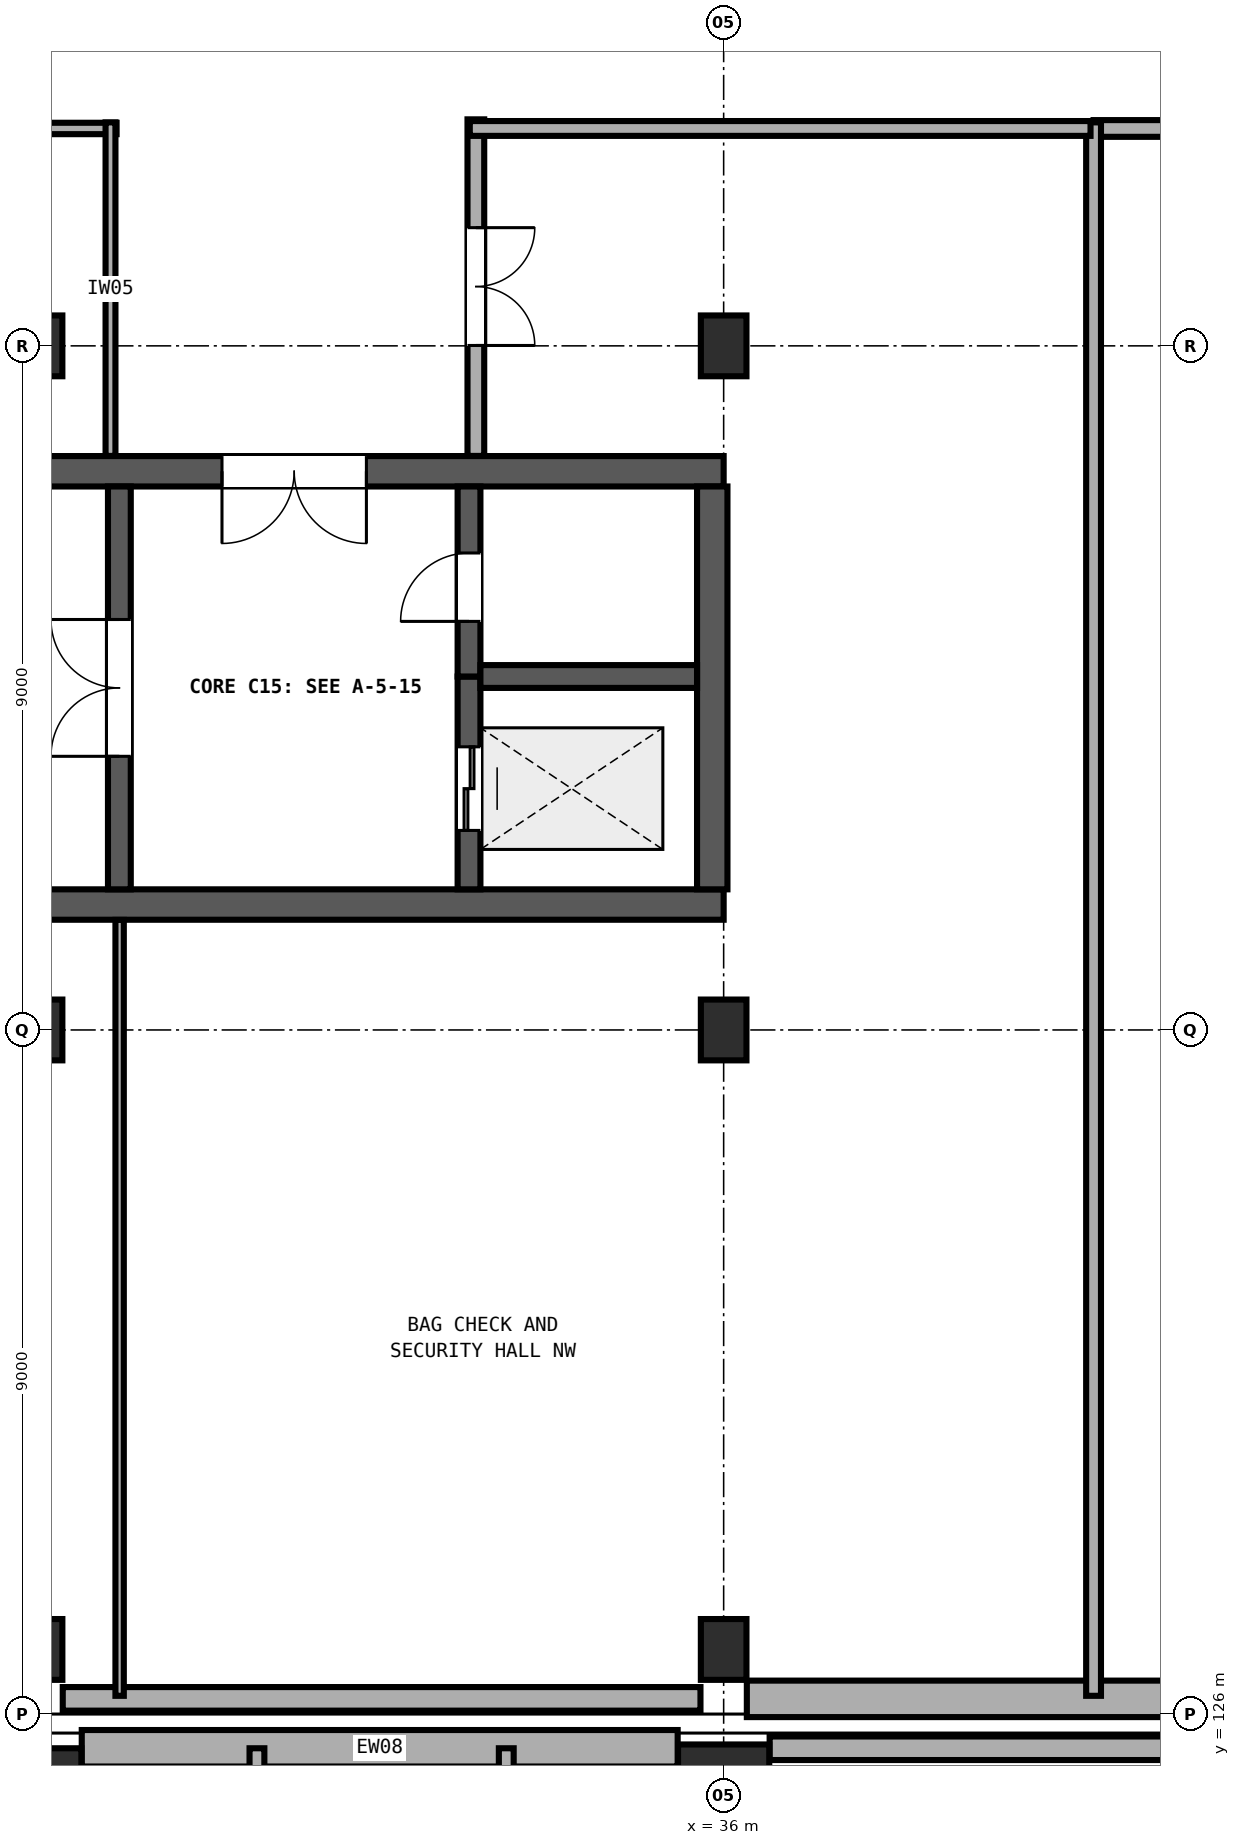
"""IFC4 building model, lengths in metres.
Left out: names, types, materials, properties, quantities, classifications, styles, units other than length and angle.
Written with IfcOpenShell. Run it as: python <this file> out.ifc"""

import sys

from ifc_helpers import new_model, si_unit, direction, frame, frame_2d, origin, origin_2d, place, context, subcontext, project, spatial, rectangle, extrude, element, fill, save


model = new_model("IFC4")
c1 = context("Model", 3, precision=1e-05, world=origin(), true_north=direction((0.0, 1.0)))
c2 = subcontext(c1, "Body", "Model", "MODEL_VIEW")
j1 = project(units=[si_unit("LENGTHUNIT", "METRE"), si_unit("PLANEANGLEUNIT", "RADIAN")], contexts=[c1])
p1 = place(None, origin())
s1 = spatial("IfcSite", under=j1, at=p1, CompositionType="ELEMENT")
p2 = place(p1, origin())
s2 = spatial("IfcBuilding", under=s1, at=p2, CompositionType="ELEMENT")
p3 = place(p2, origin())
s3 = spatial("IfcBuildingStorey", under=s2, at=p3, CompositionType="ELEMENT", Elevation=0.0)
p4 = place(p3, frame((27.0, 124.9, 0.0), z_axis=(0.0, 0.0, 1.0), x_axis=(1.0, 0.0, 0.0)))
e1 = element("IfcColumn", 1, at=p4, inside=s3, PredefinedType="COLUMN", context=c2, shape_type="SweptSolid", body=[
    extrude(rectangle(XDim=1.1, YDim=1.3, at=origin_2d()), origin(), (0.0, 0.0, 1.0), 4.8),
])
p5 = place(p3, frame((36.0, 124.9, 0.0), z_axis=(0.0, 0.0, 1.0), x_axis=(1.0, 0.0, 0.0)))
e2 = element("IfcColumn", 2, at=p5, inside=s3, PredefinedType="COLUMN", context=c2, shape_type="SweptSolid", body=[
    extrude(rectangle(XDim=1.2, YDim=1.4, at=origin_2d()), origin(), (0.0, 0.0, 1.0), 4.8),
])
for number, where, z_axis, x_axis in (
    (3, (27.0, 126.85, 0.0), (0.0, 0.0, 1.0), (1.0, 0.0, 0.0)),
    (4, (27.0, 135.0, 0.0), (0.0, 0.0, 1.0), (1.0, 0.0, 0.0)),
    (5, (27.0, 144.0, 0.0), (0.0, 0.0, 1.0), (1.0, 0.0, 0.0)),
    (6, (36.0, 126.85, 0.0), (0.0, 0.0, 1.0), (1.0, 0.0, 0.0)),
    (7, (36.0, 135.0, 0.0), (0.0, 0.0, 1.0), (1.0, 0.0, 0.0)),
    (8, (36.0, 144.0, 0.0), (0.0, 0.0, 1.0), (1.0, 0.0, 0.0)),
):
    element("IfcColumn", number, at=place(p3, frame(where, z_axis=z_axis, x_axis=x_axis)), inside=s3, PredefinedType="COLUMN", context=c2, shape_type="SweptSolid", body=[
        extrude(rectangle(XDim=0.6, YDim=0.8, at=origin_2d()), origin(), (0.0, 0.0, 1.0), 4.8),
    ])
p6 = place(p3, frame((18.0, 136.65, 0.0), z_axis=(0.0, 0.0, 1.0), x_axis=(1.0, 0.0, 0.0)))
e9 = element("IfcWall", 9, at=p6, inside=s3, PredefinedType="SHEAR", context=c2, shape_type="SweptSolid", body=[
    extrude(rectangle(XDim=18.0, YDim=0.4, at=frame_2d((9.0, 0.0))), origin(), (0.0, 0.0, 1.0), 4.5),
])
p7 = place(p3, frame((36.0, 142.35, 0.0), z_axis=(0.0, 0.0, 1.0), x_axis=(-1.0, 0.0, 0.0)))
e10 = element("IfcWall", 10, at=p7, inside=s3, PredefinedType="SHEAR", context=c2, shape_type="SweptSolid", body=[
    extrude(rectangle(XDim=18.0, YDim=0.4, at=frame_2d((9.0, 0.0))), origin(), (0.0, 0.0, 1.0), 4.5),
])
p8 = place(p7, frame((4.7, 0.0, 0.0)))
e11 = element("IfcOpeningElement", 11, at=p8, cuts=e10, PredefinedType="OPENING", context=c2, shape_type="SweptSolid", body=[
    extrude(rectangle(XDim=1.9, YDim=2.25, at=frame_2d((0.95, 1.125))), frame((0.0, 0.21, 0.0), z_axis=(0.0, -1.0, 0.0), x_axis=(1.0, 0.0, 0.0)), (0.0, 0.0, 1.0), 0.42),
])
p9 = place(p3, frame((35.85, 136.85, 0.0), z_axis=(0.0, 0.0, 1.0), x_axis=(0.0, 1.0, 0.0)))
e12 = element("IfcWall", 12, at=p9, inside=s3, PredefinedType="SHEAR", context=c2, shape_type="SweptSolid", body=[
    extrude(rectangle(XDim=5.3, YDim=0.4, at=frame_2d((2.65, 0.0))), origin(), (0.0, 0.0, 1.0), 4.5),
])
p10 = place(p3, frame((28.05, 136.85, 0.0), z_axis=(0.0, 0.0, 1.0), x_axis=(0.0, 1.0, 0.0)))
e13 = element("IfcWall", 13, at=p10, inside=s3, PredefinedType="SHEAR", context=c2, shape_type="SweptSolid", body=[
    extrude(rectangle(XDim=5.3, YDim=0.3, at=frame_2d((2.65, 0.0))), origin(), (0.0, 0.0, 1.0), 4.5),
])
p11 = place(p10, frame((1.75, 0.0, 0.0)))
e14 = element("IfcOpeningElement", 14, at=p11, cuts=e13, PredefinedType="OPENING", context=c2, shape_type="SweptSolid", body=[
    extrude(rectangle(XDim=1.8, YDim=2.25, at=frame_2d((0.9, 1.125))), frame((0.0, 0.16, 0.0), z_axis=(0.0, -1.0, 0.0), x_axis=(1.0, 0.0, 0.0)), (0.0, 0.0, 1.0), 0.32),
])
p12 = place(p3, frame((32.65, 136.85, 0.0), z_axis=(0.0, 0.0, 1.0), x_axis=(0.0, 1.0, 0.0)))
e15 = element("IfcWall", 15, at=p12, inside=s3, PredefinedType="SHEAR", context=c2, shape_type="SweptSolid", body=[
    extrude(rectangle(XDim=2.8, YDim=0.3, at=frame_2d((1.4, 0.0))), origin(), (0.0, 0.0, 1.0), 4.5),
])
p13 = place(p12, frame((0.775, 0.0, 0.0)))
e16 = element("IfcOpeningElement", 16, at=p13, cuts=e15, PredefinedType="OPENING", context=c2, shape_type="SweptSolid", body=[
    extrude(rectangle(XDim=1.1, YDim=2.1, at=frame_2d((0.55, 1.05))), frame((0.0, 0.16, 0.0), z_axis=(0.0, -1.0, 0.0), x_axis=(1.0, 0.0, 0.0)), (0.0, 0.0, 1.0), 0.32),
])
p14 = place(p3, frame((32.65, 139.65, 0.0), z_axis=(0.0, 0.0, 1.0), x_axis=(0.0, 1.0, 0.0)))
e17 = element("IfcWall", 17, at=p14, inside=s3, PredefinedType="SHEAR", context=c2, shape_type="SweptSolid", body=[
    extrude(rectangle(XDim=2.5, YDim=0.3, at=frame_2d((1.25, 0.0))), origin(), (0.0, 0.0, 1.0), 4.5),
])
p15 = place(p14, frame((0.725, 0.0, 0.0)))
e18 = element("IfcOpeningElement", 18, at=p15, cuts=e17, PredefinedType="OPENING", context=c2, shape_type="SweptSolid", body=[
    extrude(rectangle(XDim=0.9, YDim=2.1, at=frame_2d((0.45, 1.05))), frame((0.0, 0.16, 0.0), z_axis=(0.0, -1.0, 0.0), x_axis=(1.0, 0.0, 0.0)), (0.0, 0.0, 1.0), 0.32),
])
p16 = place(p3, frame((32.8, 139.65, 0.0), z_axis=(0.0, 0.0, 1.0), x_axis=(1.0, 0.0, 0.0)))
e19 = element("IfcWall", 19, at=p16, inside=s3, PredefinedType="SHEAR", context=c2, shape_type="SweptSolid", body=[
    extrude(rectangle(XDim=2.85, YDim=0.3, at=frame_2d((1.425, 0.0))), origin(), (0.0, 0.0, 1.0), 4.5),
])
p17 = place(p3, frame((27.555, 125.55, 0.0), z_axis=(0.0, 0.0, 1.0), x_axis=(1.0, 0.0, 0.0)))
e20 = element("IfcWall", 20, at=p17, inside=s3, PredefinedType="SOLIDWALL", context=c2, shape_type="SweptSolid", body=[
    extrude(rectangle(XDim=7.84, YDim=0.48, at=frame_2d((3.92, 0.0))), origin(), (0.0, 0.0, 1.0), 3.28),
])
p18 = place(p3, frame((36.605, 125.55, 0.0), z_axis=(0.0, 0.0, 1.0), x_axis=(1.0, 0.0, 0.0)))
e21 = element("IfcWall", 21, at=p18, inside=s3, PredefinedType="SOLIDWALL", context=c2, shape_type="SweptSolid", body=[
    extrude(rectangle(XDim=7.14, YDim=0.31, at=frame_2d((3.57, 0.0))), origin(), (0.0, 0.0, 1.0), 3.28),
])
p19 = place(p3, frame((44.695, 126.2, 0.0), z_axis=(0.0, 0.0, 1.0), x_axis=(-1.0, 0.0, 0.0)))
e22 = element("IfcWall", 22, at=p19, inside=s3, PredefinedType="SOLIDWALL", context=c2, shape_type="SweptSolid", body=[
    extrude(rectangle(XDim=8.39, YDim=0.48, at=frame_2d((4.195, 0.0))), origin(), (0.0, 0.0, 1.0), 3.28),
])
p20 = place(p3, frame((35.695, 126.2, 0.0), z_axis=(0.0, 0.0, 1.0), x_axis=(-1.0, 0.0, 0.0)))
e23 = element("IfcWall", 23, at=p20, inside=s3, PredefinedType="SOLIDWALL", context=c2, shape_type="SweptSolid", body=[
    extrude(rectangle(XDim=8.39, YDim=0.31, at=frame_2d((4.195, 0.0))), origin(), (0.0, 0.0, 1.0), 3.28),
])
p21 = place(p3, frame((29.86, 102.77, 0.0), z_axis=(0.0, 0.0, 1.0), x_axis=(0.0, 1.0, 0.0)))
e24 = element("IfcWall", 24, at=p21, inside=s3, PredefinedType="PARTITIONING", context=c2, shape_type="SweptSolid", body=[
    extrude(rectangle(XDim=22.78, YDim=0.195, at=frame_2d((11.39, 0.0))), origin(), (0.0, 0.0, 1.0), 3.28),
])
p22 = place(p21, frame((10.54, 0.0, 0.0)))
e25 = element("IfcOpeningElement", 25, at=p22, cuts=e24, PredefinedType="OPENING", context=c2, shape_type="SweptSolid", body=[
    extrude(rectangle(XDim=1.7, YDim=2.2, at=frame_2d((0.85, 1.1))), frame((0.0, 0.107, 0.0), z_axis=(0.0, -1.0, 0.0), x_axis=(1.0, 0.0, 0.0)), (0.0, 0.0, 1.0), 0.215),
])
p23 = place(p3, frame((33.14, 125.55, 0.0), z_axis=(0.0, 0.0, 1.0), x_axis=(0.0, -1.0, 0.0)))
e26 = element("IfcWall", 26, at=p23, inside=s3, PredefinedType="PARTITIONING", context=c2, shape_type="SweptSolid", body=[
    extrude(rectangle(XDim=17.892, YDim=0.195, at=frame_2d((8.946, 0.0))), origin(), (0.0, 0.0, 1.0), 3.28),
])
p24 = place(p23, frame((8.096, 0.0, 0.0)))
e27 = element("IfcOpeningElement", 27, at=p24, cuts=e26, PredefinedType="OPENING", context=c2, shape_type="SweptSolid", body=[
    extrude(rectangle(XDim=1.7, YDim=2.2, at=frame_2d((0.85, 1.1))), frame((0.0, 0.107, 0.0), z_axis=(0.0, -1.0, 0.0), x_axis=(1.0, 0.0, 0.0)), (0.0, 0.0, 1.0), 0.215),
])
p25 = place(p3, frame((53.8, 146.86, 0.0), z_axis=(0.0, 0.0, 1.0), x_axis=(-1.0, 0.0, 0.0)))
e28 = element("IfcWall", 28, at=p25, inside=s3, PredefinedType="PARTITIONING", context=c2, shape_type="SweptSolid", body=[
    extrude(rectangle(XDim=12.933, YDim=0.22, at=frame_2d((6.467, 0.0))), origin(), (0.0, 0.0, 1.0), 3.28),
])
p26 = place(p25, frame((5.767, 0.0, 0.0)))
e29 = element("IfcOpeningElement", 29, at=p26, cuts=e28, PredefinedType="OPENING", context=c2, shape_type="SweptSolid", body=[
    extrude(rectangle(XDim=1.4, YDim=2.15, at=frame_2d((0.7, 1.075))), frame((0.0, 0.12, 0.0), z_axis=(0.0, -1.0, 0.0), x_axis=(1.0, 0.0, 0.0)), (0.0, 0.0, 1.0), 0.24),
])
p27 = place(p3, frame((40.867, 126.24, 0.0), z_axis=(0.0, 0.0, 1.0), x_axis=(0.0, 1.0, 0.0)))
e30 = element("IfcWall", 30, at=p27, inside=s3, PredefinedType="PARTITIONING", context=c2, shape_type="SweptSolid", body=[
    extrude(rectangle(XDim=20.7, YDim=0.195, at=frame_2d((10.35, 0.0))), origin(), (0.0, 0.0, 1.0), 3.28),
])
p28 = place(p3, frame((15.16, 146.86, 0.0), z_axis=(0.0, 0.0, 1.0), x_axis=(1.0, 0.0, 0.0)))
e31 = element("IfcWall", 31, at=p28, inside=s3, PredefinedType="PARTITIONING", context=c2, shape_type="SweptSolid", body=[
    extrude(rectangle(XDim=12.853, YDim=0.15, at=frame_2d((6.427, 0.0))), origin(), (0.0, 0.0, 1.0), 3.28),
])
p29 = place(p3, frame((27.933, 146.94, 0.0), z_axis=(0.0, 0.0, 1.0), x_axis=(0.0, -1.0, 0.0)))
e32 = element("IfcWall", 32, at=p29, inside=s3, PredefinedType="PARTITIONING", context=c2, shape_type="SweptSolid", body=[
    extrude(rectangle(XDim=4.388, YDim=0.13, at=frame_2d((2.194, 0.0))), origin(), (0.0, 0.0, 1.0), 3.28),
])
p30 = place(p3, frame((28.053, 136.448, 0.0), z_axis=(0.0, 0.0, 1.0), x_axis=(0.0, -1.0, 0.0)))
e33 = element("IfcWall", 33, at=p30, inside=s3, PredefinedType="PARTITIONING", context=c2, shape_type="SweptSolid", body=[
    extrude(rectangle(XDim=10.208, YDim=0.11, at=frame_2d((5.104, 0.0))), origin(), (0.0, 0.0, 1.0), 3.28),
])
p31 = place(p3, frame((32.74, 146.98, 0.0), z_axis=(0.0, 0.0, 1.0), x_axis=(0.0, -1.0, 0.0)))
e34 = element("IfcWall", 34, at=p31, inside=s3, PredefinedType="PARTITIONING", context=c2, shape_type="SweptSolid", body=[
    extrude(rectangle(XDim=4.428, YDim=0.22, at=frame_2d((2.214, 0.0))), origin(), (0.0, 0.0, 1.0), 3.28),
])
p32 = place(p31, frame((1.425, 0.0, 0.0)))
e35 = element("IfcOpeningElement", 35, at=p32, cuts=e34, PredefinedType="OPENING", context=c2, shape_type="SweptSolid", body=[
    extrude(rectangle(XDim=1.55, YDim=2.2, at=frame_2d((0.775, 1.1))), frame((0.0, 0.12, 0.0), z_axis=(0.0, -1.0, 0.0), x_axis=(1.0, 0.0, 0.0)), (0.0, 0.0, 1.0), 0.24),
])
p33 = place(p3, frame((32.66, 146.86, 0.0), z_axis=(0.0, 0.0, 1.0), x_axis=(1.0, 0.0, 0.0)))
e36 = element("IfcWall", 36, at=p33, inside=s3, PredefinedType="PARTITIONING", context=c2, shape_type="SweptSolid", body=[
    extrude(rectangle(XDim=8.167, YDim=0.195, at=frame_2d((4.083, 0.0))), origin(), (0.0, 0.0, 1.0), 3.28),
])
p34 = place(p11, origin())
e37 = element("IfcDoor", 37, at=p34, inside=s3, OperationType="DOUBLE_DOOR_SINGLE_SWING", PredefinedType="DOOR", context=c2, shape_type="SweptSolid", body=[
    extrude(rectangle(XDim=1.8, YDim=2.25, at=frame_2d((0.9, 1.125))), frame((0.0, 0.025, 0.0), z_axis=(0.0, -1.0, 0.0), x_axis=(1.0, 0.0, 0.0)), (0.0, 0.0, 1.0), 0.05),
])
fill(e14, e37)
p35 = place(p15, origin())
e38 = element("IfcDoor", 38, at=p35, inside=s3, OperationType="SINGLE_SWING_LEFT", PredefinedType="DOOR", context=c2, shape_type="SweptSolid", body=[
    extrude(rectangle(XDim=0.9, YDim=2.1, at=frame_2d((0.45, 1.05))), frame((0.0, 0.025, 0.0), z_axis=(0.0, -1.0, 0.0), x_axis=(1.0, 0.0, 0.0)), (0.0, 0.0, 1.0), 0.05),
])
fill(e18, e38)
p36 = place(p13, origin())
e39 = element("IfcDoor", 39, at=p36, inside=s3, OperationType="DOUBLE_DOOR_SLIDING", PredefinedType="DOOR", context=c2, shape_type="SweptSolid", body=[
    extrude(rectangle(XDim=1.1, YDim=2.1, at=frame_2d((0.55, 1.05))), frame((0.0, 0.025, 0.0), z_axis=(0.0, -1.0, 0.0), x_axis=(1.0, 0.0, 0.0)), (0.0, 0.0, 1.0), 0.05),
])
fill(e16, e39)
p37 = place(p8, origin())
e40 = element("IfcDoor", 40, at=p37, inside=s3, OperationType="DOUBLE_DOOR_SINGLE_SWING", PredefinedType="DOOR", context=c2, shape_type="SweptSolid", body=[
    extrude(rectangle(XDim=1.9, YDim=2.25, at=frame_2d((0.95, 1.125))), frame((0.0, 0.025, 0.0), z_axis=(0.0, -1.0, 0.0), x_axis=(1.0, 0.0, 0.0)), (0.0, 0.0, 1.0), 0.05),
])
fill(e11, e40)
p38 = place(p32, origin())
e41 = element("IfcDoor", 41, at=p38, inside=s3, OperationType="DOUBLE_DOOR_SINGLE_SWING", PredefinedType="DOOR", context=c2, shape_type="SweptSolid", body=[
    extrude(rectangle(XDim=1.55, YDim=2.2, at=frame_2d((0.775, 1.1))), frame((0.0, 0.025, 0.0), z_axis=(0.0, -1.0, 0.0), x_axis=(1.0, 0.0, 0.0)), (0.0, 0.0, 1.0), 0.05),
])
fill(e35, e41)
save(model, sys.argv[1])
